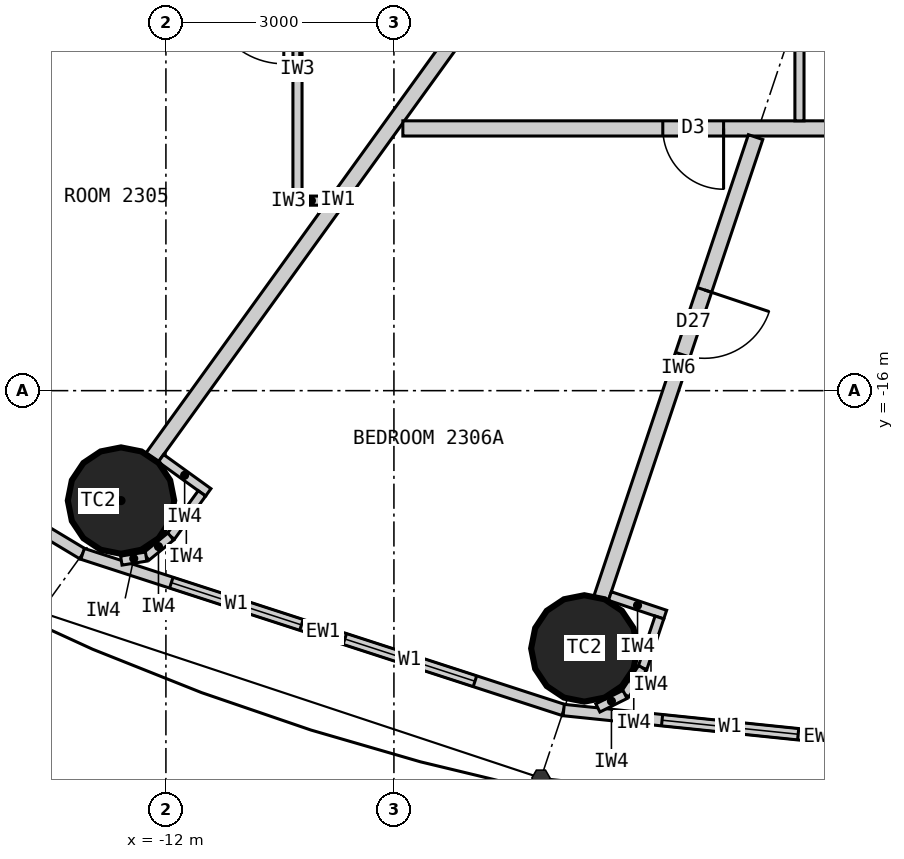
"""IFC4 building model, lengths in metres.
Left out: names, types, materials, properties, quantities, classifications, styles, units other than length and angle.
Written with IfcOpenShell. Run it as: python <this file> out.ifc"""

import sys

from ifc_helpers import new_model, si_unit, direction, frame, frame_2d, origin, origin_2d, place, context, subcontext, project, spatial, rectangle, circle, extrude, clip, halfspace, element, fill, save


model = new_model("IFC4")
c1 = context("Model", 3, precision=1e-05, world=origin(), true_north=direction((0.0, 1.0)))
c2 = subcontext(c1, "Body", "Model", "MODEL_VIEW")
j1 = project(units=[si_unit("LENGTHUNIT", "METRE"), si_unit("PLANEANGLEUNIT", "RADIAN")], contexts=[c1])
p1 = place(None, origin())
s1 = spatial("IfcSite", under=j1, at=p1, CompositionType="ELEMENT")
p2 = place(p1, origin())
s2 = spatial("IfcBuilding", under=s1, at=p2, CompositionType="ELEMENT")
p3 = place(p2, frame((0.0, 0.0, 90.3)))
s3 = spatial("IfcBuildingStorey", under=s2, at=p3, CompositionType="ELEMENT", Elevation=90.3)
for number, where, z_axis, x_axis in (
    (1, (-12.591, -17.447, 0.0), (0.0, 0.0, 1.0), (1.0, 0.0, 0.0)),
    (2, (-6.495, -19.391, 0.0), (0.0, 0.0, 1.0), (1.0, 0.0, 0.0)),
):
    element("IfcColumn", number, at=place(p3, frame(where, z_axis=z_axis, x_axis=x_axis)), inside=s3, PredefinedType="COLUMN", context=c2, shape_type="Clipping", body=[
        clip(extrude(circle(Radius=0.7, at=origin_2d()), origin(), (0.0, 0.0, 1.0), 3.3), halfspace(frame((0.0, 0.0, 2.25), z_axis=(0.0, 0.0, 1.0), x_axis=(1.0, 0.0, 0.0)), False)),
    ])
p4 = place(p3, frame((-18.57, -14.856, 0.0), z_axis=(0.0, 0.0, 1.0), x_axis=(0.856983180864, -0.515344377787, 0.0)))
e3 = element("IfcWall", 3, at=p4, inside=s3, PredefinedType="ELEMENTEDWALL", context=c2, shape_type="SweptSolid", body=[
    extrude(rectangle(XDim=6.386, YDim=0.15, at=frame_2d((3.193, 0.0))), origin(), (0.0, 0.0, 1.0), 3.05),
])
p5 = place(p4, frame((1.093, 0.0, 0.9)))
e4 = element("IfcOpeningElement", 4, at=p5, cuts=e3, PredefinedType="OPENING", context=c2, shape_type="SweptSolid", body=[
    extrude(rectangle(XDim=1.8, YDim=1.9, at=frame_2d((0.9, 0.95))), frame((0.0, 0.085, 0.0), z_axis=(0.0, -1.0, 0.0), x_axis=(1.0, 0.0, 0.0)), (0.0, 0.0, 1.0), 0.17),
])
p6 = place(p4, frame((3.493, 0.0, 0.9)))
e5 = element("IfcOpeningElement", 5, at=p6, cuts=e3, PredefinedType="OPENING", context=c2, shape_type="SweptSolid", body=[
    extrude(rectangle(XDim=1.8, YDim=1.9, at=frame_2d((0.9, 0.95))), frame((0.0, 0.085, 0.0), z_axis=(0.0, -1.0, 0.0), x_axis=(1.0, 0.0, 0.0)), (0.0, 0.0, 1.0), 0.17),
])
p7 = place(p3, frame((-13.096, -18.147, 0.0), z_axis=(0.0, 0.0, 1.0), x_axis=(0.951137534625, -0.308767534285, 0.0)))
e6 = element("IfcWall", 6, at=p7, inside=s3, PredefinedType="ELEMENTEDWALL", context=c2, shape_type="SweptSolid", body=[
    extrude(rectangle(XDim=6.655, YDim=0.15, at=frame_2d((3.328, 0.0))), origin(), (0.0, 0.0, 1.0), 3.05),
])
p8 = place(p7, frame((1.228, 0.0, 0.9)))
e7 = element("IfcOpeningElement", 7, at=p8, cuts=e6, PredefinedType="OPENING", context=c2, shape_type="SweptSolid", body=[
    extrude(rectangle(XDim=1.8, YDim=1.9, at=frame_2d((0.9, 0.95))), frame((0.0, 0.085, 0.0), z_axis=(0.0, -1.0, 0.0), x_axis=(1.0, 0.0, 0.0)), (0.0, 0.0, 1.0), 0.17),
])
p9 = place(p7, frame((3.628, 0.0, 0.9)))
e8 = element("IfcOpeningElement", 8, at=p9, cuts=e6, PredefinedType="OPENING", context=c2, shape_type="SweptSolid", body=[
    extrude(rectangle(XDim=1.8, YDim=1.9, at=frame_2d((0.9, 0.95))), frame((0.0, 0.085, 0.0), z_axis=(0.0, -1.0, 0.0), x_axis=(1.0, 0.0, 0.0)), (0.0, 0.0, 1.0), 0.17),
])
p10 = place(p3, frame((-6.766, -20.202, 0.0), z_axis=(0.0, 0.0, 1.0), x_axis=(0.994721394369, -0.102612609291, 0.0)))
e9 = element("IfcWall", 9, at=p10, inside=s3, PredefinedType="ELEMENTEDWALL", context=c2, shape_type="SweptSolid", body=[
    extrude(rectangle(XDim=6.802, YDim=0.15, at=frame_2d((3.401, 0.0))), origin(), (0.0, 0.0, 1.0), 3.05),
])
p11 = place(p10, frame((1.301, 0.0, 0.9)))
e10 = element("IfcOpeningElement", 10, at=p11, cuts=e9, PredefinedType="OPENING", context=c2, shape_type="SweptSolid", body=[
    extrude(rectangle(XDim=1.8, YDim=1.9, at=frame_2d((0.9, 0.95))), frame((0.0, 0.085, 0.0), z_axis=(0.0, -1.0, 0.0), x_axis=(1.0, 0.0, 0.0)), (0.0, 0.0, 1.0), 0.17),
])
p12 = place(p10, frame((3.701, 0.0, 0.9)))
e11 = element("IfcOpeningElement", 11, at=p12, cuts=e9, PredefinedType="OPENING", context=c2, shape_type="SweptSolid", body=[
    extrude(rectangle(XDim=1.8, YDim=1.9, at=frame_2d((0.9, 0.95))), frame((0.0, 0.085, 0.0), z_axis=(0.0, -1.0, 0.0), x_axis=(1.0, 0.0, 0.0)), (0.0, 0.0, 1.0), 0.17),
])
p13 = place(p3, frame((-7.289, -10.1, 0.0), z_axis=(0.0, 0.0, 1.0), x_axis=(-0.585198353053, -0.810890182197, 0.0)))
e12 = element("IfcWall", 12, at=p13, inside=s3, PredefinedType="PARTITIONING", context=c2, shape_type="SweptSolid", body=[
    extrude(rectangle(XDim=8.36, YDim=0.2, at=frame_2d((4.18, 0.0))), origin(), (0.0, 0.0, 1.0), 2.15),
])
p14 = place(p3, frame((-9.843, -13.5, 0.0), z_axis=(0.0, 0.0, 1.0), x_axis=(-1.0, 0.0, 0.0)))
e13 = element("IfcWall", 13, at=p14, inside=s3, PredefinedType="PARTITIONING", context=c2, shape_type="SweptSolid", body=[
    extrude(rectangle(XDim=0.486, YDim=0.12, at=frame_2d((0.243, 0.0))), origin(), (0.0, 0.0, 1.0), 3.05),
])
p15 = place(p3, frame((-10.269, -10.1, 0.0), z_axis=(0.0, 0.0, 1.0), x_axis=(0.0, -1.0, 0.0)))
e14 = element("IfcWall", 14, at=p15, inside=s3, PredefinedType="PARTITIONING", context=c2, shape_type="SweptSolid", body=[
    extrude(rectangle(XDim=3.34, YDim=0.12, at=frame_2d((1.67, 0.0))), origin(), (0.0, 0.0, 1.0), 3.05),
])
p16 = place(p15, frame((0.8, 0.0, 0.0)))
e15 = element("IfcOpeningElement", 15, at=p16, cuts=e14, PredefinedType="OPENING", context=c2, shape_type="SweptSolid", body=[
    extrude(rectangle(XDim=0.9, YDim=2.1, at=frame_2d((0.45, 1.05))), frame((0.0, 0.07, 0.0), z_axis=(0.0, -1.0, 0.0), x_axis=(1.0, 0.0, 0.0)), (0.0, 0.0, 1.0), 0.14),
])
p17 = place(p3, frame((-8.883, -12.55, 0.0), z_axis=(0.0, 0.0, 1.0), x_axis=(1.0, 0.0, 0.0)))
e16 = element("IfcWall", 16, at=p17, inside=s3, PredefinedType="PARTITIONING", context=c2, shape_type="SweptSolid", body=[
    extrude(rectangle(XDim=17.765, YDim=0.2, at=frame_2d((8.883, 0.0))), origin(), (0.0, 0.0, 1.0), 3.05),
])
p18 = place(p17, frame((3.42, 0.0, 0.0)))
e17 = element("IfcOpeningElement", 17, at=p18, cuts=e16, PredefinedType="OPENING", context=c2, shape_type="SweptSolid", body=[
    extrude(rectangle(XDim=0.8, YDim=2.1, at=frame_2d((0.4, 1.05))), frame((0.0, 0.11, 0.0), z_axis=(0.0, -1.0, 0.0), x_axis=(1.0, 0.0, 0.0)), (0.0, 0.0, 1.0), 0.22),
])
p19 = place(p17, frame((13.52, 0.0, 0.0)))
e18 = element("IfcOpeningElement", 18, at=p19, cuts=e16, PredefinedType="OPENING", context=c2, shape_type="SweptSolid", body=[
    extrude(rectangle(XDim=0.8, YDim=2.1, at=frame_2d((0.4, 1.05))), frame((0.0, 0.11, 0.0), z_axis=(0.0, -1.0, 0.0), x_axis=(1.0, 0.0, 0.0)), (0.0, 0.0, 1.0), 0.22),
])
p20 = place(p17, frame((8.42, 0.0, 0.0)))
e19 = element("IfcOpeningElement", 19, at=p20, cuts=e16, PredefinedType="OPENING", context=c2, shape_type="SweptSolid", body=[
    extrude(rectangle(XDim=0.9, YDim=2.1, at=frame_2d((0.45, 1.05))), frame((0.0, 0.11, 0.0), z_axis=(0.0, -1.0, 0.0), x_axis=(1.0, 0.0, 0.0)), (0.0, 0.0, 1.0), 0.22),
])
p21 = place(p3, frame((-4.242, -12.664, 0.0), z_axis=(0.0, 0.0, 1.0), x_axis=(-0.317590505374, -0.94822796357, 0.0)))
e20 = element("IfcWall", 20, at=p21, inside=s3, PredefinedType="PARTITIONING", context=c2, shape_type="SweptSolid", body=[
    extrude(rectangle(XDim=6.394, YDim=0.2, at=frame_2d((3.197, 0.0))), origin(), (0.0, 0.0, 1.0), 2.15),
])
p22 = place(p21, frame((2.12, 0.0, 0.0)))
e21 = element("IfcOpeningElement", 21, at=p22, cuts=e20, PredefinedType="OPENING", context=c2, shape_type="SweptSolid", body=[
    extrude(rectangle(XDim=0.9, YDim=2.1, at=frame_2d((0.45, 1.05))), frame((0.0, 0.11, 0.0), z_axis=(0.0, -1.0, 0.0), x_axis=(1.0, 0.0, 0.0)), (0.0, 0.0, 1.0), 0.22),
])
p23 = place(p3, frame((-3.665, -10.1, 0.0), z_axis=(0.0, 0.0, 1.0), x_axis=(0.0, -1.0, 0.0)))
e22 = element("IfcWall", 22, at=p23, inside=s3, PredefinedType="PARTITIONING", context=c2, shape_type="SweptSolid", body=[
    extrude(rectangle(XDim=2.35, YDim=0.12, at=frame_2d((1.175, 0.0))), origin(), (0.0, 0.0, 1.0), 3.05),
])
p24 = place(p3, frame((-12.065, -16.889, 0.0), z_axis=(0.0, 0.0, 1.0), x_axis=(0.810821798253, -0.585293098778, 0.0)))
e23 = element("IfcWall", 23, at=p24, inside=s3, PredefinedType="PARTITIONING", context=c2, shape_type="SweptSolid", body=[
    extrude(rectangle(XDim=0.768, YDim=0.12, at=frame_2d((0.384, 0.0))), origin(), (0.0, 0.0, 1.0), 3.05),
])
p25 = place(p3, frame((-11.526, -17.351, 0.0), z_axis=(0.0, 0.0, 1.0), x_axis=(-0.585223113993, -0.810872312296, 0.0)))
e24 = element("IfcWall", 24, at=p25, inside=s3, PredefinedType="PARTITIONING", context=c2, shape_type="SweptSolid", body=[
    extrude(rectangle(XDim=0.7, YDim=0.12, at=frame_2d((0.35, 0.0))), origin(), (0.0, 0.0, 1.0), 3.05),
])
p26 = place(p3, frame((-11.936, -17.919, 0.0), z_axis=(0.0, 0.0, 1.0), x_axis=(-0.775023088441, -0.631932917629, 0.0)))
e25 = element("IfcWall", 25, at=p26, inside=s3, PredefinedType="PARTITIONING", context=c2, shape_type="SweptSolid", body=[
    extrude(rectangle(XDim=0.418, YDim=0.12, at=frame_2d((0.209, 0.0))), origin(), (0.0, 0.0, 1.0), 3.05),
])
p27 = place(p3, frame((-12.26, -18.183, 0.0), z_axis=(0.0, 0.0, 1.0), x_axis=(-0.987218661664, -0.159371622511, 0.0)))
e26 = element("IfcWall", 26, at=p27, inside=s3, PredefinedType="PARTITIONING", context=c2, shape_type="SweptSolid", body=[
    extrude(rectangle(XDim=0.331, YDim=0.12, at=frame_2d((0.166, 0.0))), origin(), (0.0, 0.0, 1.0), 3.05),
])
p28 = place(p3, frame((-6.159, -18.702, 0.0), z_axis=(0.0, 0.0, 1.0), x_axis=(0.948173154049, -0.31775410295, 0.0)))
e27 = element("IfcWall", 27, at=p28, inside=s3, PredefinedType="PARTITIONING", context=c2, shape_type="SweptSolid", body=[
    extrude(rectangle(XDim=0.768, YDim=0.12, at=frame_2d((0.384, 0.0))), origin(), (0.0, 0.0, 1.0), 3.05),
])
p29 = place(p3, frame((-5.507, -18.984, 0.0), z_axis=(0.0, 0.0, 1.0), x_axis=(-0.317692050622, -0.948193946918, 0.0)))
e28 = element("IfcWall", 28, at=p29, inside=s3, PredefinedType="PARTITIONING", context=c2, shape_type="SweptSolid", body=[
    extrude(rectangle(XDim=0.7, YDim=0.12, at=frame_2d((0.35, 0.0))), origin(), (0.0, 0.0, 1.0), 3.05),
])
p30 = place(p3, frame((-5.729, -19.648, 0.0), z_axis=(0.0, 0.0, 1.0), x_axis=(-0.552135764955, -0.833754218615, 0.0)))
e29 = element("IfcWall", 29, at=p30, inside=s3, PredefinedType="PARTITIONING", context=c2, shape_type="SweptSolid", body=[
    extrude(rectangle(XDim=0.418, YDim=0.12, at=frame_2d((0.209, 0.0))), origin(), (0.0, 0.0, 1.0), 3.05),
])
p31 = place(p3, frame((-5.96, -19.996, 0.0), z_axis=(0.0, 0.0, 1.0), x_axis=(-0.895160725913, -0.445743507842, 0.0)))
e30 = element("IfcWall", 30, at=p31, inside=s3, PredefinedType="PARTITIONING", context=c2, shape_type="SweptSolid", body=[
    extrude(rectangle(XDim=0.399, YDim=0.12, at=frame_2d((0.199, 0.0))), origin(), (0.0, 0.0, 1.0), 3.05),
])
p32 = place(p8, origin())
e31 = element("IfcWindow", 31, at=p32, inside=s3, PartitioningType="SINGLE_PANEL", PredefinedType="WINDOW", context=c2, shape_type="SweptSolid", body=[
    extrude(rectangle(XDim=1.8, YDim=1.9, at=frame_2d((0.9, 0.95))), frame((0.0, 0.03, 0.0), z_axis=(0.0, -1.0, 0.0), x_axis=(1.0, 0.0, 0.0)), (0.0, 0.0, 1.0), 0.06),
])
fill(e7, e31)
p33 = place(p9, origin())
e32 = element("IfcWindow", 32, at=p33, inside=s3, PartitioningType="SINGLE_PANEL", PredefinedType="WINDOW", context=c2, shape_type="SweptSolid", body=[
    extrude(rectangle(XDim=1.8, YDim=1.9, at=frame_2d((0.9, 0.95))), frame((0.0, 0.03, 0.0), z_axis=(0.0, -1.0, 0.0), x_axis=(1.0, 0.0, 0.0)), (0.0, 0.0, 1.0), 0.06),
])
fill(e8, e32)
p34 = place(p11, origin())
e33 = element("IfcWindow", 33, at=p34, inside=s3, PartitioningType="SINGLE_PANEL", PredefinedType="WINDOW", context=c2, shape_type="SweptSolid", body=[
    extrude(rectangle(XDim=1.8, YDim=1.9, at=frame_2d((0.9, 0.95))), frame((0.0, 0.03, 0.0), z_axis=(0.0, -1.0, 0.0), x_axis=(1.0, 0.0, 0.0)), (0.0, 0.0, 1.0), 0.06),
])
fill(e10, e33)
p35 = place(p16, origin())
e34 = element("IfcDoor", 34, at=p35, inside=s3, OperationType="SLIDING_TO_LEFT", PredefinedType="DOOR", context=c2, shape_type="SweptSolid", body=[
    extrude(rectangle(XDim=0.9, YDim=2.1, at=frame_2d((0.45, 1.05))), frame((0.0, 0.025, 0.0), z_axis=(0.0, -1.0, 0.0), x_axis=(1.0, 0.0, 0.0)), (0.0, 0.0, 1.0), 0.05),
])
fill(e15, e34)
p36 = place(p18, origin())
e35 = element("IfcDoor", 35, at=p36, inside=s3, OperationType="SINGLE_SWING_RIGHT", PredefinedType="DOOR", context=c2, shape_type="SweptSolid", body=[
    extrude(rectangle(XDim=0.8, YDim=2.1, at=frame_2d((0.4, 1.05))), frame((0.0, 0.025, 0.0), z_axis=(0.0, -1.0, 0.0), x_axis=(1.0, 0.0, 0.0)), (0.0, 0.0, 1.0), 0.05),
])
fill(e17, e35)
p37 = place(p22, origin())
e36 = element("IfcDoor", 36, at=p37, inside=s3, OperationType="SINGLE_SWING_LEFT", PredefinedType="DOOR", context=c2, shape_type="SweptSolid", body=[
    extrude(rectangle(XDim=0.9, YDim=2.1, at=frame_2d((0.45, 1.05))), frame((0.0, 0.025, 0.0), z_axis=(0.0, -1.0, 0.0), x_axis=(1.0, 0.0, 0.0)), (0.0, 0.0, 1.0), 0.05),
])
fill(e21, e36)
save(model, sys.argv[1])
